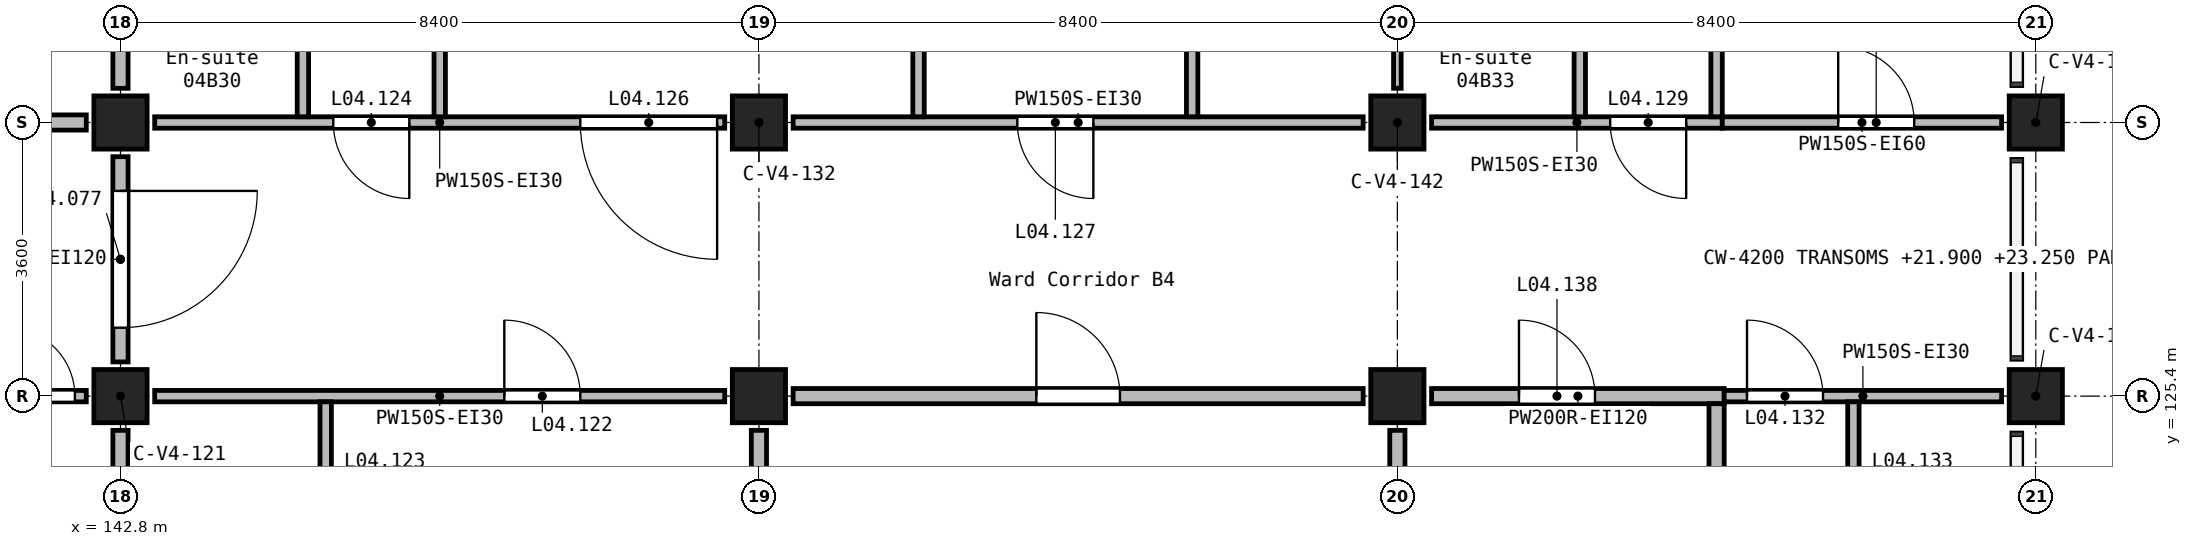
"""IFC4 building model, lengths in metres.
Left out: names, types, materials, properties, quantities, classifications, styles, units other than length and angle.
Written with IfcOpenShell. Run it as: python <this file> out.ifc"""

import sys

from ifc_helpers import new_model, si_unit, direction, frame, frame_2d, origin, origin_2d, place, context, subcontext, project, spatial, rectangle, extrude, element, fill, save


model = new_model("IFC4")
c1 = context("Model", 3, precision=1e-05, world=origin(), true_north=direction((0.0, 1.0)))
c2 = subcontext(c1, "Body", "Model", "MODEL_VIEW")
j1 = project(units=[si_unit("LENGTHUNIT", "METRE"), si_unit("PLANEANGLEUNIT", "RADIAN")], contexts=[c1])
p1 = place(None, origin())
s1 = spatial("IfcSite", under=j1, at=p1, CompositionType="ELEMENT")
p2 = place(p1, origin())
s2 = spatial("IfcBuilding", under=s1, at=p2, CompositionType="ELEMENT")
p3 = place(p2, frame((0.0, 0.0, 21.0)))
s3 = spatial("IfcBuildingStorey", under=s2, at=p3, CompositionType="ELEMENT", Elevation=21.0)
for number, where, z_axis, x_axis in (
    (1, (142.8, 125.4, 0.0), (0.0, 0.0, 1.0), (1.0, 0.0, 0.0)),
    (2, (142.8, 129.0, 0.0), (0.0, 0.0, 1.0), (1.0, 0.0, 0.0)),
    (3, (151.2, 125.4, 0.0), (0.0, 0.0, 1.0), (1.0, 0.0, 0.0)),
    (4, (151.2, 129.0, 0.0), (0.0, 0.0, 1.0), (1.0, 0.0, 0.0)),
    (5, (159.6, 125.4, 0.0), (0.0, 0.0, 1.0), (1.0, 0.0, 0.0)),
    (6, (159.6, 129.0, 0.0), (0.0, 0.0, 1.0), (1.0, 0.0, 0.0)),
    (7, (168.0, 125.4, 0.0), (0.0, 0.0, 1.0), (1.0, 0.0, 0.0)),
    (8, (168.0, 129.0, 0.0), (0.0, 0.0, 1.0), (1.0, 0.0, 0.0)),
):
    element("IfcColumn", number, at=place(p3, frame(where, z_axis=z_axis, x_axis=x_axis)), inside=s3, PredefinedType="COLUMN", context=c2, shape_type="SweptSolid", body=[
        extrude(rectangle(XDim=0.7, YDim=0.7, at=origin_2d()), origin(), (0.0, 0.0, 1.0), 3.9),
    ])
p4 = place(p3, frame((142.8, 131.425, 0.0), z_axis=(0.0, 0.0, 1.0), x_axis=(0.0, -1.0, 0.0)))
e9 = element("IfcWall", 9, at=p4, inside=s3, PredefinedType="SOLIDWALL", context=c2, shape_type="SweptSolid", body=[
    extrude(rectangle(XDim=1.975, YDim=0.2, at=frame_2d((0.988, 0.0))), origin(), (0.0, 0.0, 1.0), 3.6),
])
p5 = place(p3, frame((142.8, 128.55, 0.0), z_axis=(0.0, 0.0, 1.0), x_axis=(0.0, -1.0, 0.0)))
e10 = element("IfcWall", 10, at=p5, inside=s3, PredefinedType="SOLIDWALL", context=c2, shape_type="SweptSolid", body=[
    extrude(rectangle(XDim=2.7, YDim=0.2, at=frame_2d((1.35, 0.0))), origin(), (0.0, 0.0, 1.0), 3.6),
])
p6 = place(p5, frame((0.45, 0.0, 0.0)))
e11 = element("IfcOpeningElement", 11, at=p6, cuts=e10, PredefinedType="OPENING", context=c2, shape_type="SweptSolid", body=[
    extrude(rectangle(XDim=1.8, YDim=2.1, at=frame_2d((0.9, 1.05))), frame((0.0, 0.11, 0.0), z_axis=(0.0, -1.0, 0.0), x_axis=(1.0, 0.0, 0.0)), (0.0, 0.0, 1.0), 0.22),
])
p7 = place(p3, frame((142.8, 124.95, 0.0), z_axis=(0.0, 0.0, 1.0), x_axis=(0.0, -1.0, 0.0)))
e12 = element("IfcWall", 12, at=p7, inside=s3, PredefinedType="SOLIDWALL", context=c2, shape_type="SweptSolid", body=[
    extrude(rectangle(XDim=6.9, YDim=0.2, at=frame_2d((3.45, 0.0))), origin(), (0.0, 0.0, 1.0), 3.6),
])
p8 = place(p3, frame((151.65, 125.4, 0.0), z_axis=(0.0, 0.0, 1.0), x_axis=(1.0, 0.0, 0.0)))
e13 = element("IfcWall", 13, at=p8, inside=s3, PredefinedType="SOLIDWALL", context=c2, shape_type="SweptSolid", body=[
    extrude(rectangle(XDim=7.5, YDim=0.2, at=frame_2d((3.75, 0.0))), origin(), (0.0, 0.0, 1.0), 3.6),
])
p9 = place(p8, frame((3.2, 0.0, 0.0)))
e14 = element("IfcOpeningElement", 14, at=p9, cuts=e13, PredefinedType="OPENING", context=c2, shape_type="SweptSolid", body=[
    extrude(rectangle(XDim=1.1, YDim=2.1, at=frame_2d((0.55, 1.05))), frame((0.0, 0.11, 0.0), z_axis=(0.0, -1.0, 0.0), x_axis=(1.0, 0.0, 0.0)), (0.0, 0.0, 1.0), 0.22),
])
p10 = place(p3, frame((160.05, 125.4, 0.0), z_axis=(0.0, 0.0, 1.0), x_axis=(1.0, 0.0, 0.0)))
e15 = element("IfcWall", 15, at=p10, inside=s3, PredefinedType="SOLIDWALL", context=c2, shape_type="SweptSolid", body=[
    extrude(rectangle(XDim=3.85, YDim=0.2, at=frame_2d((1.925, 0.0))), origin(), (0.0, 0.0, 1.0), 3.6),
])
p11 = place(p10, frame((1.15, 0.0, 0.0)))
e16 = element("IfcOpeningElement", 16, at=p11, cuts=e15, PredefinedType="OPENING", context=c2, shape_type="SweptSolid", body=[
    extrude(rectangle(XDim=1.0, YDim=2.1, at=frame_2d((0.5, 1.05))), frame((0.0, 0.11, 0.0), z_axis=(0.0, -1.0, 0.0), x_axis=(1.0, 0.0, 0.0)), (0.0, 0.0, 1.0), 0.22),
])
p12 = place(p3, frame((134.85, 129.0, 0.0), z_axis=(0.0, 0.0, 1.0), x_axis=(1.0, 0.0, 0.0)))
e17 = element("IfcWall", 17, at=p12, inside=s3, PredefinedType="SOLIDWALL", context=c2, shape_type="SweptSolid", body=[
    extrude(rectangle(XDim=7.5, YDim=0.2, at=frame_2d((3.75, 0.0))), origin(), (0.0, 0.0, 1.0), 3.6),
])
p13 = place(p12, frame((2.85, 0.0, 0.0)))
e18 = element("IfcOpeningElement", 18, at=p13, cuts=e17, PredefinedType="OPENING", context=c2, shape_type="SweptSolid", body=[
    extrude(rectangle(XDim=1.8, YDim=2.1, at=frame_2d((0.9, 1.05))), frame((0.0, 0.11, 0.0), z_axis=(0.0, -1.0, 0.0), x_axis=(1.0, 0.0, 0.0)), (0.0, 0.0, 1.0), 0.22),
])
p14 = place(p3, frame((159.6, 123.175, 0.0), z_axis=(0.0, 0.0, 1.0), x_axis=(0.0, 1.0, 0.0)))
e19 = element("IfcWall", 19, at=p14, inside=s3, PredefinedType="SOLIDWALL", context=c2, shape_type="SweptSolid", body=[
    extrude(rectangle(XDim=1.775, YDim=0.2, at=frame_2d((0.887, 0.0))), origin(), (0.0, 0.0, 1.0), 3.6),
])
p15 = place(p3, frame((163.8, 118.05, 0.0), z_axis=(0.0, 0.0, 1.0), x_axis=(0.0, 1.0, 0.0)))
e20 = element("IfcWall", 20, at=p15, inside=s3, PredefinedType="SOLIDWALL", context=c2, shape_type="SweptSolid", body=[
    extrude(rectangle(XDim=7.25, YDim=0.2, at=frame_2d((3.625, 0.0))), origin(), (0.0, 0.0, 1.0), 3.6),
])
p16 = place(p3, frame((151.2, 123.175, 0.0), z_axis=(0.0, 0.0, 1.0), x_axis=(0.0, 1.0, 0.0)))
e21 = element("IfcWall", 21, at=p16, inside=s3, PredefinedType="SOLIDWALL", context=c2, shape_type="SweptSolid", body=[
    extrude(rectangle(XDim=1.775, YDim=0.2, at=frame_2d((0.887, 0.0))), origin(), (0.0, 0.0, 1.0), 3.6),
])
p17 = place(p3, frame((163.875, 129.0, 0.0), z_axis=(0.0, 0.0, 1.0), x_axis=(-1.0, 0.0, 0.0)))
e22 = element("IfcWall", 22, at=p17, inside=s3, PredefinedType="PARTITIONING", context=c2, shape_type="SweptSolid", body=[
    extrude(rectangle(XDim=3.825, YDim=0.15, at=frame_2d((1.913, 0.0))), origin(), (0.0, 0.0, 1.0), 3.6),
])
p18 = place(p17, frame((0.475, 0.0, 0.0)))
e23 = element("IfcOpeningElement", 23, at=p18, cuts=e22, PredefinedType="OPENING", context=c2, shape_type="SweptSolid", body=[
    extrude(rectangle(XDim=1.0, YDim=2.1, at=frame_2d((0.5, 1.05))), frame((0.0, 0.085, 0.0), z_axis=(0.0, -1.0, 0.0), x_axis=(1.0, 0.0, 0.0)), (0.0, 0.0, 1.0), 0.17),
])
p19 = place(p3, frame((159.15, 129.0, 0.0), z_axis=(0.0, 0.0, 1.0), x_axis=(-1.0, 0.0, 0.0)))
e24 = element("IfcWall", 24, at=p19, inside=s3, PredefinedType="PARTITIONING", context=c2, shape_type="SweptSolid", body=[
    extrude(rectangle(XDim=7.5, YDim=0.15, at=frame_2d((3.75, 0.0))), origin(), (0.0, 0.0, 1.0), 3.6),
])
p20 = place(p19, frame((3.55, 0.0, 0.0)))
e25 = element("IfcOpeningElement", 25, at=p20, cuts=e24, PredefinedType="OPENING", context=c2, shape_type="SweptSolid", body=[
    extrude(rectangle(XDim=1.0, YDim=2.1, at=frame_2d((0.5, 1.05))), frame((0.0, 0.085, 0.0), z_axis=(0.0, -1.0, 0.0), x_axis=(1.0, 0.0, 0.0)), (0.0, 0.0, 1.0), 0.17),
])
p21 = place(p3, frame((150.75, 129.0, 0.0), z_axis=(0.0, 0.0, 1.0), x_axis=(-1.0, 0.0, 0.0)))
e26 = element("IfcWall", 26, at=p21, inside=s3, PredefinedType="PARTITIONING", context=c2, shape_type="SweptSolid", body=[
    extrude(rectangle(XDim=7.5, YDim=0.15, at=frame_2d((3.75, 0.0))), origin(), (0.0, 0.0, 1.0), 3.6),
])
p22 = place(p21, frame((4.15, 0.0, 0.0)))
e27 = element("IfcOpeningElement", 27, at=p22, cuts=e26, PredefinedType="OPENING", context=c2, shape_type="SweptSolid", body=[
    extrude(rectangle(XDim=1.0, YDim=2.1, at=frame_2d((0.5, 1.05))), frame((0.0, 0.085, 0.0), z_axis=(0.0, -1.0, 0.0), x_axis=(1.0, 0.0, 0.0)), (0.0, 0.0, 1.0), 0.17),
])
p23 = place(p21, frame((0.1, 0.0, 0.0)))
e28 = element("IfcOpeningElement", 28, at=p23, cuts=e26, PredefinedType="OPENING", context=c2, shape_type="SweptSolid", body=[
    extrude(rectangle(XDim=1.8, YDim=2.1, at=frame_2d((0.9, 1.05))), frame((0.0, 0.085, 0.0), z_axis=(0.0, -1.0, 0.0), x_axis=(1.0, 0.0, 0.0)), (0.0, 0.0, 1.0), 0.17),
])
p24 = place(p3, frame((143.25, 125.4, 0.0), z_axis=(0.0, 0.0, 1.0), x_axis=(1.0, 0.0, 0.0)))
e29 = element("IfcWall", 29, at=p24, inside=s3, PredefinedType="PARTITIONING", context=c2, shape_type="SweptSolid", body=[
    extrude(rectangle(XDim=7.5, YDim=0.15, at=frame_2d((3.75, 0.0))), origin(), (0.0, 0.0, 1.0), 3.6),
])
p25 = place(p24, frame((4.6, 0.0, 0.0)))
e30 = element("IfcOpeningElement", 30, at=p25, cuts=e29, PredefinedType="OPENING", context=c2, shape_type="SweptSolid", body=[
    extrude(rectangle(XDim=1.0, YDim=2.1, at=frame_2d((0.5, 1.05))), frame((0.0, 0.085, 0.0), z_axis=(0.0, -1.0, 0.0), x_axis=(1.0, 0.0, 0.0)), (0.0, 0.0, 1.0), 0.17),
])
p26 = place(p3, frame((138.525, 125.4, 0.0), z_axis=(0.0, 0.0, 1.0), x_axis=(1.0, 0.0, 0.0)))
e31 = element("IfcWall", 31, at=p26, inside=s3, PredefinedType="PARTITIONING", context=c2, shape_type="SweptSolid", body=[
    extrude(rectangle(XDim=3.825, YDim=0.15, at=frame_2d((1.913, 0.0))), origin(), (0.0, 0.0, 1.0), 3.6),
])
p27 = place(p26, frame((0.675, 0.0, 0.0)))
e32 = element("IfcOpeningElement", 32, at=p27, cuts=e31, PredefinedType="OPENING", context=c2, shape_type="SweptSolid", body=[
    extrude(rectangle(XDim=0.9, YDim=2.1, at=frame_2d((0.45, 1.05))), frame((0.0, 0.085, 0.0), z_axis=(0.0, -1.0, 0.0), x_axis=(1.0, 0.0, 0.0)), (0.0, 0.0, 1.0), 0.17),
])
p28 = place(p26, frame((2.775, 0.0, 0.0)))
e33 = element("IfcOpeningElement", 33, at=p28, cuts=e31, PredefinedType="OPENING", context=c2, shape_type="SweptSolid", body=[
    extrude(rectangle(XDim=0.9, YDim=2.1, at=frame_2d((0.45, 1.05))), frame((0.0, 0.085, 0.0), z_axis=(0.0, -1.0, 0.0), x_axis=(1.0, 0.0, 0.0)), (0.0, 0.0, 1.0), 0.17),
])
p29 = place(p3, frame((163.9, 125.4, 0.0), z_axis=(0.0, 0.0, 1.0), x_axis=(1.0, 0.0, 0.0)))
e34 = element("IfcWall", 34, at=p29, inside=s3, PredefinedType="PARTITIONING", context=c2, shape_type="SweptSolid", body=[
    extrude(rectangle(XDim=3.65, YDim=0.15, at=frame_2d((1.825, 0.0))), origin(), (0.0, 0.0, 1.0), 3.6),
])
p30 = place(p29, frame((0.3, 0.0, 0.0)))
e35 = element("IfcOpeningElement", 35, at=p30, cuts=e34, PredefinedType="OPENING", context=c2, shape_type="SweptSolid", body=[
    extrude(rectangle(XDim=1.0, YDim=2.1, at=frame_2d((0.5, 1.05))), frame((0.0, 0.085, 0.0), z_axis=(0.0, -1.0, 0.0), x_axis=(1.0, 0.0, 0.0)), (0.0, 0.0, 1.0), 0.17),
])
p31 = place(p3, frame((163.875, 129.0, 0.0), z_axis=(0.0, 0.0, 1.0), x_axis=(1.0, 0.0, 0.0)))
e36 = element("IfcWall", 36, at=p31, inside=s3, PredefinedType="PARTITIONING", context=c2, shape_type="SweptSolid", body=[
    extrude(rectangle(XDim=3.675, YDim=0.15, at=frame_2d((1.837, 0.0))), origin(), (0.0, 0.0, 1.0), 3.6),
])
p32 = place(p31, frame((1.525, 0.0, 0.0)))
e37 = element("IfcOpeningElement", 37, at=p32, cuts=e36, PredefinedType="OPENING", context=c2, shape_type="SweptSolid", body=[
    extrude(rectangle(XDim=1.0, YDim=2.1, at=frame_2d((0.5, 1.05))), frame((0.0, 0.085, 0.0), z_axis=(0.0, -1.0, 0.0), x_axis=(1.0, 0.0, 0.0)), (0.0, 0.0, 1.0), 0.17),
])
for number, where, z_axis, x_axis in (
    (38, (147.0, 129.075, 0.0), (0.0, 0.0, 1.0), (0.0, 1.0, 0.0)),
    (39, (153.3, 129.075, 0.0), (0.0, 0.0, 1.0), (0.0, 1.0, 0.0)),
    (40, (163.8, 129.075, 0.0), (0.0, 0.0, 1.0), (0.0, 1.0, 0.0)),
):
    element("IfcWall", number, at=place(p3, frame(where, z_axis=z_axis, x_axis=x_axis)), inside=s3, PredefinedType="PARTITIONING", context=c2, shape_type="SweptSolid", body=[
        extrude(rectangle(XDim=7.275, YDim=0.15, at=frame_2d((3.638, 0.0))), origin(), (0.0, 0.0, 1.0), 3.6),
    ])
p33 = place(p3, frame((145.2, 129.075, 0.0), z_axis=(0.0, 0.0, 1.0), x_axis=(0.0, 1.0, 0.0)))
e41 = element("IfcWall", 41, at=p33, inside=s3, PredefinedType="PARTITIONING", context=c2, shape_type="SweptSolid", body=[
    extrude(rectangle(XDim=3.3, YDim=0.15, at=frame_2d((1.65, 0.0))), origin(), (0.0, 0.0, 1.0), 3.6),
])
p34 = place(p33, frame((1.125, 0.0, 0.0)))
e42 = element("IfcOpeningElement", 42, at=p34, cuts=e41, PredefinedType="OPENING", context=c2, shape_type="SweptSolid", body=[
    extrude(rectangle(XDim=0.9, YDim=2.1, at=frame_2d((0.45, 1.05))), frame((0.0, 0.085, 0.0), z_axis=(0.0, -1.0, 0.0), x_axis=(1.0, 0.0, 0.0)), (0.0, 0.0, 1.0), 0.17),
])
p35 = place(p3, frame((145.5, 122.025, 0.0), z_axis=(0.0, 0.0, 1.0), x_axis=(0.0, 1.0, 0.0)))
e43 = element("IfcWall", 43, at=p35, inside=s3, PredefinedType="PARTITIONING", context=c2, shape_type="SweptSolid", body=[
    extrude(rectangle(XDim=3.3, YDim=0.15, at=frame_2d((1.65, 0.0))), origin(), (0.0, 0.0, 1.0), 3.6),
])
p36 = place(p35, frame((1.275, 0.0, 0.0)))
e44 = element("IfcOpeningElement", 44, at=p36, cuts=e43, PredefinedType="OPENING", context=c2, shape_type="SweptSolid", body=[
    extrude(rectangle(XDim=0.9, YDim=2.1, at=frame_2d((0.45, 1.05))), frame((0.0, 0.085, 0.0), z_axis=(0.0, -1.0, 0.0), x_axis=(1.0, 0.0, 0.0)), (0.0, 0.0, 1.0), 0.17),
])
p37 = place(p3, frame((156.9, 129.075, 0.0), z_axis=(0.0, 0.0, 1.0), x_axis=(0.0, 1.0, 0.0)))
e45 = element("IfcWall", 45, at=p37, inside=s3, PredefinedType="PARTITIONING", context=c2, shape_type="SweptSolid", body=[
    extrude(rectangle(XDim=3.15, YDim=0.15, at=frame_2d((1.575, 0.0))), origin(), (0.0, 0.0, 1.0), 3.6),
])
p38 = place(p37, frame((1.125, 0.0, 0.0)))
e46 = element("IfcOpeningElement", 46, at=p38, cuts=e45, PredefinedType="OPENING", context=c2, shape_type="SweptSolid", body=[
    extrude(rectangle(XDim=0.9, YDim=2.1, at=frame_2d((0.45, 1.05))), frame((0.0, 0.085, 0.0), z_axis=(0.0, -1.0, 0.0), x_axis=(1.0, 0.0, 0.0)), (0.0, 0.0, 1.0), 0.17),
])
p39 = place(p3, frame((162.0, 129.075, 0.0), z_axis=(0.0, 0.0, 1.0), x_axis=(0.0, 1.0, 0.0)))
e47 = element("IfcWall", 47, at=p39, inside=s3, PredefinedType="PARTITIONING", context=c2, shape_type="SweptSolid", body=[
    extrude(rectangle(XDim=3.15, YDim=0.15, at=frame_2d((1.575, 0.0))), origin(), (0.0, 0.0, 1.0), 3.6),
])
p40 = place(p39, frame((1.125, 0.0, 0.0)))
e48 = element("IfcOpeningElement", 48, at=p40, cuts=e47, PredefinedType="OPENING", context=c2, shape_type="SweptSolid", body=[
    extrude(rectangle(XDim=0.9, YDim=2.1, at=frame_2d((0.45, 1.05))), frame((0.0, 0.085, 0.0), z_axis=(0.0, -1.0, 0.0), x_axis=(1.0, 0.0, 0.0)), (0.0, 0.0, 1.0), 0.17),
])
p41 = place(p3, frame((165.6, 122.025, 0.0), z_axis=(0.0, 0.0, 1.0), x_axis=(0.0, 1.0, 0.0)))
e49 = element("IfcWall", 49, at=p41, inside=s3, PredefinedType="PARTITIONING", context=c2, shape_type="SweptSolid", body=[
    extrude(rectangle(XDim=3.3, YDim=0.15, at=frame_2d((1.65, 0.0))), origin(), (0.0, 0.0, 1.0), 3.6),
])
p42 = place(p41, frame((1.275, 0.0, 0.0)))
e50 = element("IfcOpeningElement", 50, at=p42, cuts=e49, PredefinedType="OPENING", context=c2, shape_type="SweptSolid", body=[
    extrude(rectangle(XDim=0.9, YDim=2.1, at=frame_2d((0.45, 1.05))), frame((0.0, 0.085, 0.0), z_axis=(0.0, -1.0, 0.0), x_axis=(1.0, 0.0, 0.0)), (0.0, 0.0, 1.0), 0.17),
])
p43 = place(p3, frame((159.6, 129.45, 0.0), z_axis=(0.0, 0.0, 1.0), x_axis=(0.0, 1.0, 0.0)))
e51 = element("IfcWall", 51, at=p43, inside=s3, PredefinedType="PARTITIONING", context=c2, shape_type="SweptSolid", body=[
    extrude(rectangle(XDim=2.775, YDim=0.1, at=frame_2d((1.388, 0.0))), origin(), (0.0, 0.0, 1.0), 3.6),
])
p44 = place(p6, origin())
e52 = element("IfcDoor", 52, at=p44, inside=s3, OperationType="DOUBLE_DOOR_SINGLE_SWING", PredefinedType="DOOR", context=c2, shape_type="SweptSolid", body=[
    extrude(rectangle(XDim=1.8, YDim=2.1, at=frame_2d((0.9, 1.05))), frame((0.0, 0.025, 0.0), z_axis=(0.0, -1.0, 0.0), x_axis=(1.0, 0.0, 0.0)), (0.0, 0.0, 1.0), 0.05),
])
fill(e11, e52)
p45 = place(p28, frame((0.9, 0.0, 0.0), z_axis=(0.0, 0.0, 1.0), x_axis=(-1.0, 0.0, 0.0)))
e53 = element("IfcDoor", 53, at=p45, inside=s3, OperationType="SINGLE_SWING_LEFT", PredefinedType="DOOR", context=c2, shape_type="SweptSolid", body=[
    extrude(rectangle(XDim=0.9, YDim=2.1, at=frame_2d((0.45, 1.05))), frame((0.0, 0.025, 0.0), z_axis=(0.0, -1.0, 0.0), x_axis=(1.0, 0.0, 0.0)), (0.0, 0.0, 1.0), 0.05),
])
fill(e33, e53)
p46 = place(p25, frame((1.0, 0.0, 0.0), z_axis=(0.0, 0.0, 1.0), x_axis=(-1.0, 0.0, 0.0)))
e54 = element("IfcDoor", 54, at=p46, inside=s3, OperationType="SINGLE_SWING_LEFT", PredefinedType="DOOR", context=c2, shape_type="SweptSolid", body=[
    extrude(rectangle(XDim=1.0, YDim=2.1, at=frame_2d((0.5, 1.05))), frame((0.0, 0.025, 0.0), z_axis=(0.0, -1.0, 0.0), x_axis=(1.0, 0.0, 0.0)), (0.0, 0.0, 1.0), 0.05),
])
fill(e30, e54)
p47 = place(p22, frame((1.0, 0.0, 0.0), z_axis=(0.0, 0.0, 1.0), x_axis=(-1.0, 0.0, 0.0)))
e55 = element("IfcDoor", 55, at=p47, inside=s3, OperationType="SINGLE_SWING_LEFT", PredefinedType="DOOR", context=c2, shape_type="SweptSolid", body=[
    extrude(rectangle(XDim=1.0, YDim=2.1, at=frame_2d((0.5, 1.05))), frame((0.0, 0.025, 0.0), z_axis=(0.0, -1.0, 0.0), x_axis=(1.0, 0.0, 0.0)), (0.0, 0.0, 1.0), 0.05),
])
fill(e27, e55)
p48 = place(p23, frame((1.8, 0.0, 0.0), z_axis=(0.0, 0.0, 1.0), x_axis=(-1.0, 0.0, 0.0)))
e56 = element("IfcDoor", 56, at=p48, inside=s3, OperationType="DOUBLE_DOOR_SINGLE_SWING", PredefinedType="DOOR", context=c2, shape_type="SweptSolid", body=[
    extrude(rectangle(XDim=1.8, YDim=2.1, at=frame_2d((0.9, 1.05))), frame((0.0, 0.025, 0.0), z_axis=(0.0, -1.0, 0.0), x_axis=(1.0, 0.0, 0.0)), (0.0, 0.0, 1.0), 0.05),
])
fill(e28, e56)
p49 = place(p20, frame((1.0, 0.0, 0.0), z_axis=(0.0, 0.0, 1.0), x_axis=(-1.0, 0.0, 0.0)))
e57 = element("IfcDoor", 57, at=p49, inside=s3, OperationType="SINGLE_SWING_LEFT", PredefinedType="DOOR", context=c2, shape_type="SweptSolid", body=[
    extrude(rectangle(XDim=1.0, YDim=2.1, at=frame_2d((0.5, 1.05))), frame((0.0, 0.025, 0.0), z_axis=(0.0, -1.0, 0.0), x_axis=(1.0, 0.0, 0.0)), (0.0, 0.0, 1.0), 0.05),
])
fill(e25, e57)
p50 = place(p18, frame((1.0, 0.0, 0.0), z_axis=(0.0, 0.0, 1.0), x_axis=(-1.0, 0.0, 0.0)))
e58 = element("IfcDoor", 58, at=p50, inside=s3, OperationType="SINGLE_SWING_RIGHT", PredefinedType="DOOR", context=c2, shape_type="SweptSolid", body=[
    extrude(rectangle(XDim=1.0, YDim=2.1, at=frame_2d((0.5, 1.05))), frame((0.0, 0.025, 0.0), z_axis=(0.0, -1.0, 0.0), x_axis=(1.0, 0.0, 0.0)), (0.0, 0.0, 1.0), 0.05),
])
fill(e23, e58)
p51 = place(p32, origin())
e59 = element("IfcDoor", 59, at=p51, inside=s3, OperationType="SINGLE_SWING_RIGHT", PredefinedType="DOOR", context=c2, shape_type="SweptSolid", body=[
    extrude(rectangle(XDim=1.0, YDim=2.1, at=frame_2d((0.5, 1.05))), frame((0.0, 0.025, 0.0), z_axis=(0.0, -1.0, 0.0), x_axis=(1.0, 0.0, 0.0)), (0.0, 0.0, 1.0), 0.05),
])
fill(e37, e59)
p52 = place(p30, frame((1.0, 0.0, 0.0), z_axis=(0.0, 0.0, 1.0), x_axis=(-1.0, 0.0, 0.0)))
e60 = element("IfcDoor", 60, at=p52, inside=s3, OperationType="SINGLE_SWING_RIGHT", PredefinedType="DOOR", context=c2, shape_type="SweptSolid", body=[
    extrude(rectangle(XDim=1.0, YDim=2.1, at=frame_2d((0.5, 1.05))), frame((0.0, 0.025, 0.0), z_axis=(0.0, -1.0, 0.0), x_axis=(1.0, 0.0, 0.0)), (0.0, 0.0, 1.0), 0.05),
])
fill(e35, e60)
p53 = place(p11, frame((1.0, 0.0, 0.0), z_axis=(0.0, 0.0, 1.0), x_axis=(-1.0, 0.0, 0.0)))
e61 = element("IfcDoor", 61, at=p53, inside=s3, OperationType="SINGLE_SWING_RIGHT", PredefinedType="DOOR", context=c2, shape_type="SweptSolid", body=[
    extrude(rectangle(XDim=1.0, YDim=2.1, at=frame_2d((0.5, 1.05))), frame((0.0, 0.025, 0.0), z_axis=(0.0, -1.0, 0.0), x_axis=(1.0, 0.0, 0.0)), (0.0, 0.0, 1.0), 0.05),
])
fill(e16, e61)
p54 = place(p9, frame((1.1, 0.0, 0.0), z_axis=(0.0, 0.0, 1.0), x_axis=(-1.0, 0.0, 0.0)))
e62 = element("IfcDoor", 62, at=p54, inside=s3, OperationType="SINGLE_SWING_LEFT", PredefinedType="DOOR", context=c2, shape_type="SweptSolid", body=[
    extrude(rectangle(XDim=1.1, YDim=2.1, at=frame_2d((0.55, 1.05))), frame((0.0, 0.025, 0.0), z_axis=(0.0, -1.0, 0.0), x_axis=(1.0, 0.0, 0.0)), (0.0, 0.0, 1.0), 0.05),
])
fill(e14, e62)
save(model, sys.argv[1])
